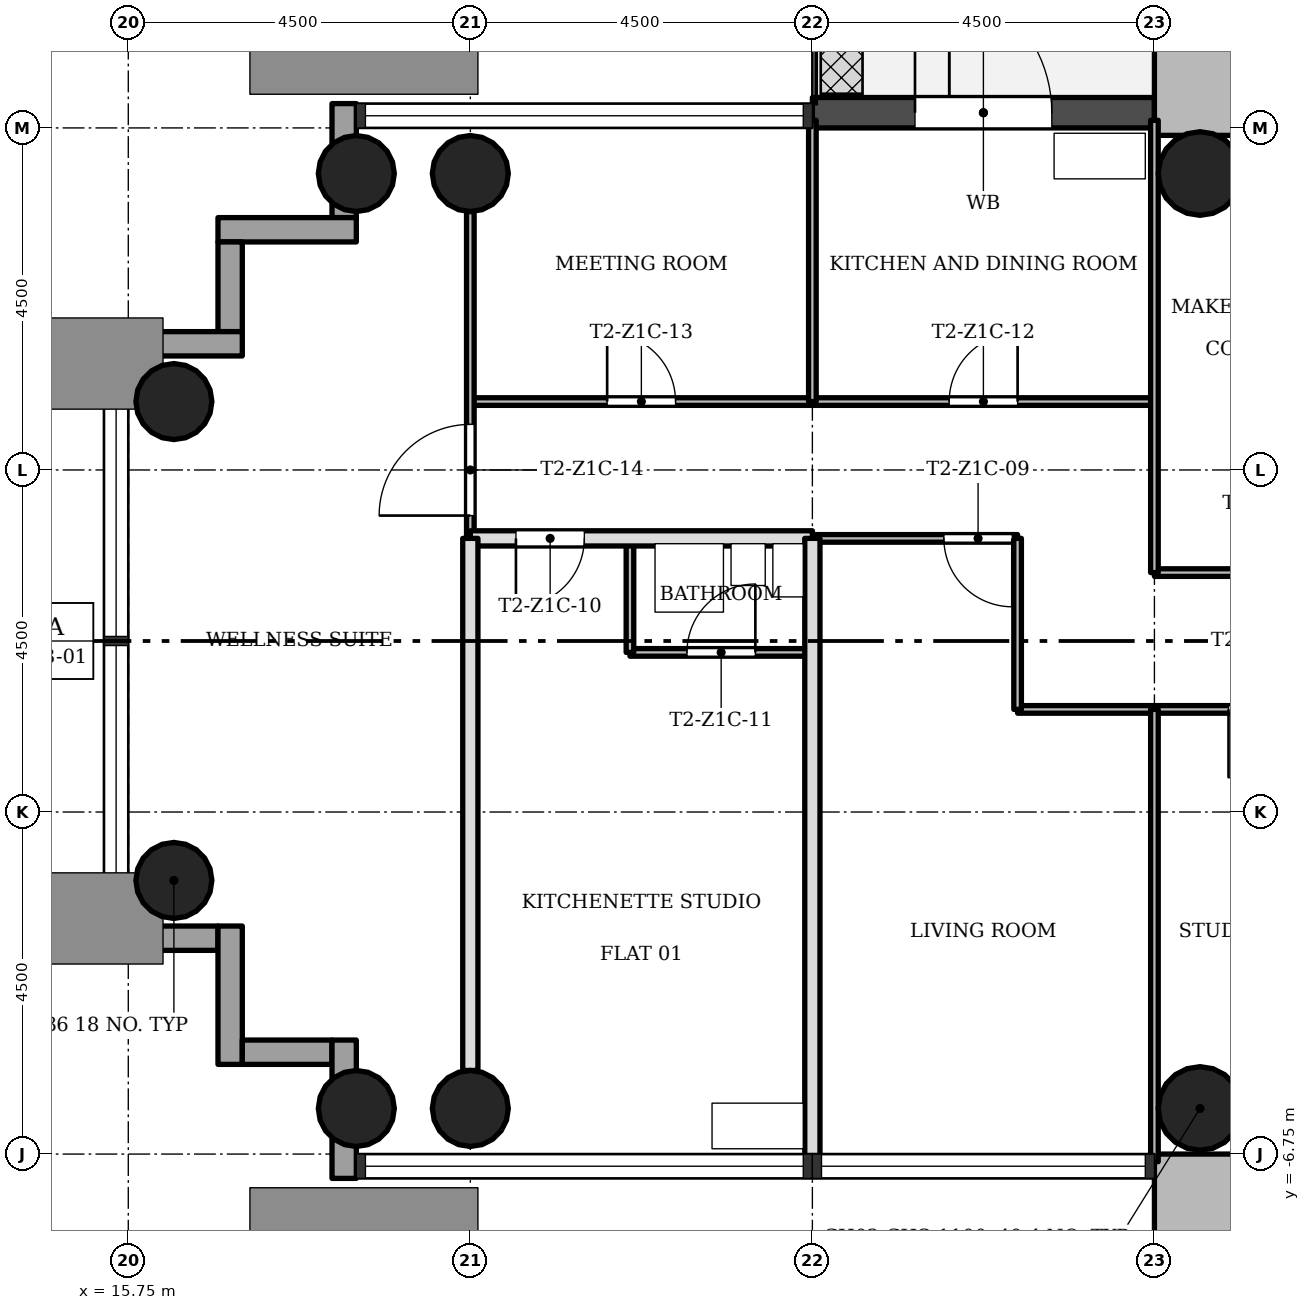
"""IFC4 building model, lengths in metres.
Left out: names, types, materials, properties, quantities, classifications, styles, units other than length and angle.
Written with IfcOpenShell. Run it as: python <this file> out.ifc"""

import sys

from ifc_helpers import new_model, si_unit, direction, frame, frame_2d, origin, origin_2d, place, context, subcontext, project, spatial, rectangle, hollow_circle, extrude, element, fill, save


model = new_model("IFC4")
c1 = context("Model", 3, precision=1e-05, world=origin(), true_north=direction((0.0, 1.0)))
c2 = subcontext(c1, "Body", "Model", "MODEL_VIEW")
j1 = project(units=[si_unit("LENGTHUNIT", "METRE"), si_unit("PLANEANGLEUNIT", "RADIAN")], contexts=[c1])
p1 = place(None, origin())
s1 = spatial("IfcSite", under=j1, at=p1, CompositionType="ELEMENT")
p2 = place(p1, origin())
s2 = spatial("IfcBuilding", under=s1, at=p2, CompositionType="ELEMENT")
p3 = place(p2, frame((0.0, 0.0, 44.9)))
s3 = spatial("IfcBuildingStorey", under=s2, at=p3, CompositionType="ELEMENT", Elevation=44.9)
p4 = place(p3, frame((29.8, 15.248, 0.0), z_axis=(0.0, 0.0, 1.0), x_axis=(0.0, -1.0, 0.0)))
e1 = element("IfcWall", 1, at=p4, inside=s3, PredefinedType="SHEAR", context=c2, shape_type="SweptSolid", body=[
    extrude(rectangle(XDim=8.596, YDim=1.1, at=frame_2d((4.298, 0.0))), origin(), (0.0, 0.0, 1.0), 3.4),
])
p5 = place(p3, frame((41.65, -7.3, 0.0), z_axis=(0.0, 0.0, 1.0), x_axis=(-1.0, 0.0, 0.0)))
e2 = element("IfcWall", 2, at=p5, inside=s3, PredefinedType="SHEAR", context=c2, shape_type="SweptSolid", body=[
    extrude(rectangle(XDim=12.4, YDim=1.1, at=frame_2d((6.2, 0.0))), origin(), (0.0, 0.0, 1.0), 3.4),
])
p6 = place(p5, frame((4.75, 0.0, 0.0)))
e3 = element("IfcOpeningElement", 3, at=p6, cuts=e2, PredefinedType="OPENING", context=c2, shape_type="SweptSolid", body=[
    extrude(rectangle(XDim=1.8, YDim=2.1, at=frame_2d((0.9, 1.05))), frame((0.0, 0.56, 0.0), z_axis=(0.0, -1.0, 0.0), x_axis=(1.0, 0.0, 0.0)), (0.0, 0.0, 1.0), 1.12),
])
for number, where, z_axis, x_axis in (
    (4, (20.25, 6.15, 0.0), (0.0, 0.0, 1.0), (1.0, 0.0, 0.0)),
    (5, (20.25, -6.15, 0.0), (0.0, 0.0, 1.0), (1.0, 0.0, 0.0)),
    (6, (18.75, 6.15, 0.0), (0.0, 0.0, 1.0), (1.0, 0.0, 0.0)),
    (7, (18.75, -6.15, 0.0), (0.0, 0.0, 1.0), (1.0, 0.0, 0.0)),
    (8, (16.35, 3.15, 0.0), (0.0, 0.0, 1.0), (1.0, 0.0, 0.0)),
    (9, (16.35, -3.15, 0.0), (0.0, 0.0, 1.0), (1.0, 0.0, 0.0)),
):
    element("IfcColumn", number, at=place(p3, frame(where, z_axis=z_axis, x_axis=x_axis)), inside=s3, PredefinedType="COLUMN", context=c2, shape_type="SweptSolid", body=[
        extrude(hollow_circle(Radius=0.5, WallThickness=0.036, at=origin_2d()), origin(), (0.0, 0.0, 1.0), 3.4),
    ])
for number, where, z_axis, x_axis in (
    (10, (29.85, 6.15, 0.0), (0.0, 0.0, 1.0), (1.0, 0.0, 0.0)),
    (11, (29.85, -6.15, 0.0), (0.0, 0.0, 1.0), (1.0, 0.0, 0.0)),
):
    element("IfcColumn", number, at=place(p3, frame(where, z_axis=z_axis, x_axis=x_axis)), inside=s3, PredefinedType="COLUMN", context=c2, shape_type="SweptSolid", body=[
        extrude(hollow_circle(Radius=0.55, WallThickness=0.04, at=origin_2d()), origin(), (0.0, 0.0, 1.0), 3.4),
    ])
p7 = place(p3, frame((29.25, 6.95, -0.02), z_axis=(0.0, 0.0, 1.0), x_axis=(-1.0, 0.0, 0.0)))
e12 = element("IfcWall", 12, at=p7, inside=s3, PredefinedType="STANDARD", context=c2, shape_type="SweptSolid", body=[
    extrude(rectangle(XDim=4.5, YDim=0.4, at=frame_2d((2.25, 0.0))), origin(), (0.0, 0.0, 1.0), 3.12),
])
p8 = place(p7, frame((1.35, 0.0, 0.02)))
e13 = element("IfcOpeningElement", 13, at=p8, cuts=e12, PredefinedType="OPENING", context=c2, shape_type="SweptSolid", body=[
    extrude(rectangle(XDim=1.8, YDim=2.1, at=frame_2d((0.9, 1.05))), frame((0.0, 0.21, 0.0), z_axis=(0.0, -1.0, 0.0), x_axis=(1.0, 0.0, 0.0)), (0.0, 0.0, 1.0), 0.42),
])
p9 = place(p3, frame((18.59, 7.07, -0.3), z_axis=(0.0, 0.0, 1.0), x_axis=(0.0, -1.0, 0.0)))
e14 = element("IfcWall", 14, at=p9, inside=s3, PredefinedType="STANDARD", context=c2, shape_type="SweptSolid", body=[
    extrude(rectangle(XDim=1.5, YDim=0.32, at=frame_2d((0.75, 0.0))), origin(), (0.0, 0.0, 1.0), 3.4),
])
p10 = place(p3, frame((18.75, 5.41, -0.3), z_axis=(0.0, 0.0, 1.0), x_axis=(-1.0, 0.0, 0.0)))
e15 = element("IfcWall", 15, at=p10, inside=s3, PredefinedType="STANDARD", context=c2, shape_type="SweptSolid", body=[
    extrude(rectangle(XDim=1.82, YDim=0.32, at=frame_2d((0.91, 0.0))), origin(), (0.0, 0.0, 1.0), 3.4),
])
p11 = place(p3, frame((17.09, 5.25, -0.3), z_axis=(0.0, 0.0, 1.0), x_axis=(0.0, -1.0, 0.0)))
e16 = element("IfcWall", 16, at=p11, inside=s3, PredefinedType="STANDARD", context=c2, shape_type="SweptSolid", body=[
    extrude(rectangle(XDim=1.18, YDim=0.32, at=frame_2d((0.59, 0.0))), origin(), (0.0, 0.0, 1.0), 3.4),
])
p12 = place(p3, frame((17.25, 3.91, -0.3), z_axis=(0.0, 0.0, 1.0), x_axis=(-1.0, 0.0, 0.0)))
e17 = element("IfcWall", 17, at=p12, inside=s3, PredefinedType="STANDARD", context=c2, shape_type="SweptSolid", body=[
    extrude(rectangle(XDim=1.82, YDim=0.32, at=frame_2d((0.91, 0.0))), origin(), (0.0, 0.0, 1.0), 3.4),
])
p13 = place(p3, frame((15.43, -3.91, -0.3), z_axis=(0.0, 0.0, 1.0), x_axis=(1.0, 0.0, 0.0)))
e18 = element("IfcWall", 18, at=p13, inside=s3, PredefinedType="STANDARD", context=c2, shape_type="SweptSolid", body=[
    extrude(rectangle(XDim=1.5, YDim=0.32, at=frame_2d((0.75, 0.0))), origin(), (0.0, 0.0, 1.0), 3.4),
])
p14 = place(p3, frame((17.09, -3.75, -0.3), z_axis=(0.0, 0.0, 1.0), x_axis=(0.0, -1.0, 0.0)))
e19 = element("IfcWall", 19, at=p14, inside=s3, PredefinedType="STANDARD", context=c2, shape_type="SweptSolid", body=[
    extrude(rectangle(XDim=1.82, YDim=0.32, at=frame_2d((0.91, 0.0))), origin(), (0.0, 0.0, 1.0), 3.4),
])
p15 = place(p3, frame((17.25, -5.41, -0.3), z_axis=(0.0, 0.0, 1.0), x_axis=(1.0, 0.0, 0.0)))
e20 = element("IfcWall", 20, at=p15, inside=s3, PredefinedType="STANDARD", context=c2, shape_type="SweptSolid", body=[
    extrude(rectangle(XDim=1.18, YDim=0.32, at=frame_2d((0.59, 0.0))), origin(), (0.0, 0.0, 1.0), 3.4),
])
p16 = place(p3, frame((18.59, -5.25, -0.3), z_axis=(0.0, 0.0, 1.0), x_axis=(0.0, -1.0, 0.0)))
e21 = element("IfcWall", 21, at=p16, inside=s3, PredefinedType="STANDARD", context=c2, shape_type="SweptSolid", body=[
    extrude(rectangle(XDim=1.82, YDim=0.32, at=frame_2d((0.91, 0.0))), origin(), (0.0, 0.0, 1.0), 3.4),
])
p17 = place(p3, frame((34.5, -0.9, 0.0), z_axis=(0.0, 0.0, 1.0), x_axis=(-1.0, 0.0, 0.0)))
e22 = element("IfcWall", 22, at=p17, inside=s3, PredefinedType="PARTITIONING", context=c2, shape_type="SweptSolid", body=[
    extrude(rectangle(XDim=7.05, YDim=0.1, at=frame_2d((3.525, 0.0))), origin(), (0.0, 0.0, 1.0), 3.0),
])
p18 = place(p17, frame((0.75, 0.0, 0.0)))
e23 = element("IfcOpeningElement", 23, at=p18, cuts=e22, PredefinedType="OPENING", context=c2, shape_type="SweptSolid", body=[
    extrude(rectangle(XDim=0.9, YDim=2.1, at=frame_2d((0.45, 1.05))), frame((0.0, 0.06, 0.0), z_axis=(0.0, -1.0, 0.0), x_axis=(1.0, 0.0, 0.0)), (0.0, 0.0, 1.0), 0.12),
])
p19 = place(p17, frame((3.375, 0.0, 0.0)))
e24 = element("IfcOpeningElement", 24, at=p19, cuts=e22, PredefinedType="OPENING", context=c2, shape_type="SweptSolid", body=[
    extrude(rectangle(XDim=0.9, YDim=2.1, at=frame_2d((0.45, 1.05))), frame((0.0, 0.06, 0.0), z_axis=(0.0, -1.0, 0.0), x_axis=(1.0, 0.0, 0.0)), (0.0, 0.0, 1.0), 0.12),
])
p20 = place(p3, frame((24.75, -0.15, 0.0), z_axis=(0.0, 0.0, 1.0), x_axis=(-1.0, 0.0, 0.0)))
e25 = element("IfcWall", 25, at=p20, inside=s3, PredefinedType="PARTITIONING", context=c2, shape_type="SweptSolid", body=[
    extrude(rectangle(XDim=2.4, YDim=0.1, at=frame_2d((1.2, 0.0))), origin(), (0.0, 0.0, 1.0), 3.0),
])
p21 = place(p20, frame((0.75, 0.0, 0.0)))
e26 = element("IfcOpeningElement", 26, at=p21, cuts=e25, PredefinedType="OPENING", context=c2, shape_type="SweptSolid", body=[
    extrude(rectangle(XDim=0.9, YDim=2.1, at=frame_2d((0.45, 1.05))), frame((0.0, 0.06, 0.0), z_axis=(0.0, -1.0, 0.0), x_axis=(1.0, 0.0, 0.0)), (0.0, 0.0, 1.0), 0.12),
])
p22 = place(p3, frame((34.5, 0.9, 0.0), z_axis=(0.0, 0.0, 1.0), x_axis=(-1.0, 0.0, 0.0)))
e27 = element("IfcWall", 27, at=p22, inside=s3, PredefinedType="PARTITIONING", context=c2, shape_type="SweptSolid", body=[
    extrude(rectangle(XDim=5.25, YDim=0.1, at=frame_2d((2.625, 0.0))), origin(), (0.0, 0.0, 1.0), 3.0),
])
p23 = place(p22, frame((3.225, 0.0, 0.0)))
e28 = element("IfcOpeningElement", 28, at=p23, cuts=e27, PredefinedType="OPENING", context=c2, shape_type="SweptSolid", body=[
    extrude(rectangle(XDim=0.9, YDim=2.1, at=frame_2d((0.45, 1.05))), frame((0.0, 0.06, 0.0), z_axis=(0.0, -1.0, 0.0), x_axis=(1.0, 0.0, 0.0)), (0.0, 0.0, 1.0), 0.12),
])
p24 = place(p3, frame((27.45, 1.35, 0.0), z_axis=(0.0, 0.0, 1.0), x_axis=(-1.0, 0.0, 0.0)))
e29 = element("IfcWall", 29, at=p24, inside=s3, PredefinedType="PARTITIONING", context=c2, shape_type="SweptSolid", body=[
    extrude(rectangle(XDim=2.7, YDim=0.1, at=frame_2d((1.35, 0.0))), origin(), (0.0, 0.0, 1.0), 3.0),
])
p25 = place(p24, frame((0.07, 0.0, 0.0)))
e30 = element("IfcOpeningElement", 30, at=p25, cuts=e29, PredefinedType="OPENING", context=c2, shape_type="SweptSolid", body=[
    extrude(rectangle(XDim=0.9, YDim=2.1, at=frame_2d((0.45, 1.05))), frame((0.0, 0.06, 0.0), z_axis=(0.0, -1.0, 0.0), x_axis=(1.0, 0.0, 0.0)), (0.0, 0.0, 1.0), 0.12),
])
p26 = place(p3, frame((24.75, 1.35, 0.0), z_axis=(0.0, 0.0, 1.0), x_axis=(-1.0, 0.0, 0.0)))
e31 = element("IfcWall", 31, at=p26, inside=s3, PredefinedType="SOLIDWALL", context=c2, shape_type="SweptSolid", body=[
    extrude(rectangle(XDim=4.5, YDim=0.2, at=frame_2d((2.25, 0.0))), origin(), (0.0, 0.0, 1.0), 3.0),
])
p27 = place(p26, frame((3.0, 0.0, 0.0)))
e32 = element("IfcOpeningElement", 32, at=p27, cuts=e31, PredefinedType="OPENING", context=c2, shape_type="SweptSolid", body=[
    extrude(rectangle(XDim=0.9, YDim=2.1, at=frame_2d((0.45, 1.05))), frame((0.0, 0.11, 0.0), z_axis=(0.0, -1.0, 0.0), x_axis=(1.0, 0.0, 0.0)), (0.0, 0.0, 1.0), 0.22),
])
p28 = place(p3, frame((29.25, 3.15, 0.0), z_axis=(0.0, 0.0, 1.0), x_axis=(-1.0, 0.0, 0.0)))
e33 = element("IfcWall", 33, at=p28, inside=s3, PredefinedType="PARTITIONING", context=c2, shape_type="SweptSolid", body=[
    extrude(rectangle(XDim=9.0, YDim=0.1, at=frame_2d((4.5, 0.0))), origin(), (0.0, 0.0, 1.0), 3.0),
])
p29 = place(p28, frame((1.8, 0.0, 0.0)))
e34 = element("IfcOpeningElement", 34, at=p29, cuts=e33, PredefinedType="OPENING", context=c2, shape_type="SweptSolid", body=[
    extrude(rectangle(XDim=0.9, YDim=2.1, at=frame_2d((0.45, 1.05))), frame((0.0, 0.06, 0.0), z_axis=(0.0, -1.0, 0.0), x_axis=(1.0, 0.0, 0.0)), (0.0, 0.0, 1.0), 0.12),
])
p30 = place(p28, frame((6.3, 0.0, 0.0)))
e35 = element("IfcOpeningElement", 35, at=p30, cuts=e33, PredefinedType="OPENING", context=c2, shape_type="SweptSolid", body=[
    extrude(rectangle(XDim=0.9, YDim=2.1, at=frame_2d((0.45, 1.05))), frame((0.0, 0.06, 0.0), z_axis=(0.0, -1.0, 0.0), x_axis=(1.0, 0.0, 0.0)), (0.0, 0.0, 1.0), 0.12),
])
for number, where, z_axis, x_axis in (
    (36, (29.25, -6.85, 0.0), (0.0, 0.0, 1.0), (0.0, 1.0, 0.0)),
    (37, (29.25, 0.9, 0.0), (0.0, 0.0, 1.0), (0.0, 1.0, 0.0)),
):
    element("IfcWall", number, at=place(p3, frame(where, z_axis=z_axis, x_axis=x_axis)), inside=s3, PredefinedType="PARTITIONING", context=c2, shape_type="SweptSolid", body=[
        extrude(rectangle(XDim=5.95, YDim=0.1, at=frame_2d((2.975, 0.0))), origin(), (0.0, 0.0, 1.0), 3.0),
    ])
p31 = place(p3, frame((27.45, -0.9, 0.0), z_axis=(0.0, 0.0, 1.0), x_axis=(0.0, 1.0, 0.0)))
e38 = element("IfcWall", 38, at=p31, inside=s3, PredefinedType="PARTITIONING", context=c2, shape_type="SweptSolid", body=[
    extrude(rectangle(XDim=2.25, YDim=0.1, at=frame_2d((1.125, 0.0))), origin(), (0.0, 0.0, 1.0), 3.0),
])
p32 = place(p3, frame((24.75, 3.15, 0.0), z_axis=(0.0, 0.0, 1.0), x_axis=(0.0, 1.0, 0.0)))
e39 = element("IfcWall", 39, at=p32, inside=s3, PredefinedType="PARTITIONING", context=c2, shape_type="SweptSolid", body=[
    extrude(rectangle(XDim=3.7, YDim=0.1, at=frame_2d((1.85, 0.0))), origin(), (0.0, 0.0, 1.0), 3.0),
])
p33 = place(p3, frame((24.75, -6.85, 0.0), z_axis=(0.0, 0.0, 1.0), x_axis=(0.0, 1.0, 0.0)))
e40 = element("IfcWall", 40, at=p33, inside=s3, PredefinedType="SOLIDWALL", context=c2, shape_type="SweptSolid", body=[
    extrude(rectangle(XDim=8.2, YDim=0.2, at=frame_2d((4.1, 0.0))), origin(), (0.0, 0.0, 1.0), 3.0),
])
p34 = place(p3, frame((22.35, -0.15, 0.0), z_axis=(0.0, 0.0, 1.0), x_axis=(0.0, 1.0, 0.0)))
e41 = element("IfcWall", 41, at=p34, inside=s3, PredefinedType="PARTITIONING", context=c2, shape_type="SweptSolid", body=[
    extrude(rectangle(XDim=1.5, YDim=0.1, at=frame_2d((0.75, 0.0))), origin(), (0.0, 0.0, 1.0), 3.0),
])
p35 = place(p3, frame((20.25, 1.35, 0.0), z_axis=(0.0, 0.0, 1.0), x_axis=(0.0, 1.0, 0.0)))
e42 = element("IfcWall", 42, at=p35, inside=s3, PredefinedType="PARTITIONING", context=c2, shape_type="SweptSolid", body=[
    extrude(rectangle(XDim=4.3, YDim=0.1, at=frame_2d((2.15, 0.0))), origin(), (0.0, 0.0, 1.0), 3.0),
])
p36 = place(p35, frame((0.3, 0.0, 0.0)))
e43 = element("IfcOpeningElement", 43, at=p36, cuts=e42, PredefinedType="OPENING", context=c2, shape_type="SweptSolid", body=[
    extrude(rectangle(XDim=1.2, YDim=2.1, at=frame_2d((0.6, 1.05))), frame((0.0, 0.06, 0.0), z_axis=(0.0, -1.0, 0.0), x_axis=(1.0, 0.0, 0.0)), (0.0, 0.0, 1.0), 0.12),
])
p37 = place(p3, frame((20.25, -5.65, 0.0), z_axis=(0.0, 0.0, 1.0), x_axis=(0.0, 1.0, 0.0)))
e44 = element("IfcWall", 44, at=p37, inside=s3, PredefinedType="SOLIDWALL", context=c2, shape_type="SweptSolid", body=[
    extrude(rectangle(XDim=7.0, YDim=0.2, at=frame_2d((3.5, 0.0))), origin(), (0.0, 0.0, 1.0), 3.0),
])
p38 = place(p8, origin())
e45 = element("IfcDoor", 45, at=p38, inside=s3, OperationType="SINGLE_SWING_RIGHT", PredefinedType="DOOR", context=c2, shape_type="SweptSolid", body=[
    extrude(rectangle(XDim=1.8, YDim=2.1, at=frame_2d((0.9, 1.05))), frame((0.0, 0.025, 0.0), z_axis=(0.0, -1.0, 0.0), x_axis=(1.0, 0.0, 0.0)), (0.0, 0.0, 1.0), 0.05),
])
fill(e13, e45)
p39 = place(p19, origin())
e46 = element("IfcDoor", 46, at=p39, inside=s3, OperationType="SINGLE_SWING_LEFT", PredefinedType="DOOR", context=c2, shape_type="SweptSolid", body=[
    extrude(rectangle(XDim=0.9, YDim=2.1, at=frame_2d((0.45, 1.05))), frame((0.0, 0.025, 0.0), z_axis=(0.0, -1.0, 0.0), x_axis=(1.0, 0.0, 0.0)), (0.0, 0.0, 1.0), 0.05),
])
fill(e24, e46)
p40 = place(p25, origin())
e47 = element("IfcDoor", 47, at=p40, inside=s3, OperationType="SINGLE_SWING_RIGHT", PredefinedType="DOOR", context=c2, shape_type="SweptSolid", body=[
    extrude(rectangle(XDim=0.9, YDim=2.1, at=frame_2d((0.45, 1.05))), frame((0.0, 0.025, 0.0), z_axis=(0.0, -1.0, 0.0), x_axis=(1.0, 0.0, 0.0)), (0.0, 0.0, 1.0), 0.05),
])
fill(e30, e47)
p41 = place(p27, origin())
e48 = element("IfcDoor", 48, at=p41, inside=s3, OperationType="SINGLE_SWING_LEFT", PredefinedType="DOOR", context=c2, shape_type="SweptSolid", body=[
    extrude(rectangle(XDim=0.9, YDim=2.1, at=frame_2d((0.45, 1.05))), frame((0.0, 0.025, 0.0), z_axis=(0.0, -1.0, 0.0), x_axis=(1.0, 0.0, 0.0)), (0.0, 0.0, 1.0), 0.05),
])
fill(e32, e48)
p42 = place(p21, origin())
e49 = element("IfcDoor", 49, at=p42, inside=s3, OperationType="SINGLE_SWING_LEFT", PredefinedType="DOOR", context=c2, shape_type="SweptSolid", body=[
    extrude(rectangle(XDim=0.9, YDim=2.1, at=frame_2d((0.45, 1.05))), frame((0.0, 0.025, 0.0), z_axis=(0.0, -1.0, 0.0), x_axis=(1.0, 0.0, 0.0)), (0.0, 0.0, 1.0), 0.05),
])
fill(e26, e49)
p43 = place(p29, origin())
e50 = element("IfcDoor", 50, at=p43, inside=s3, OperationType="SINGLE_SWING_LEFT", PredefinedType="DOOR", context=c2, shape_type="SweptSolid", body=[
    extrude(rectangle(XDim=0.9, YDim=2.1, at=frame_2d((0.45, 1.05))), frame((0.0, 0.025, 0.0), z_axis=(0.0, -1.0, 0.0), x_axis=(1.0, 0.0, 0.0)), (0.0, 0.0, 1.0), 0.05),
])
fill(e34, e50)
p44 = place(p30, origin())
e51 = element("IfcDoor", 51, at=p44, inside=s3, OperationType="SINGLE_SWING_RIGHT", PredefinedType="DOOR", context=c2, shape_type="SweptSolid", body=[
    extrude(rectangle(XDim=0.9, YDim=2.1, at=frame_2d((0.45, 1.05))), frame((0.0, 0.025, 0.0), z_axis=(0.0, -1.0, 0.0), x_axis=(1.0, 0.0, 0.0)), (0.0, 0.0, 1.0), 0.05),
])
fill(e35, e51)
p45 = place(p36, origin())
e52 = element("IfcDoor", 52, at=p45, inside=s3, OperationType="SINGLE_SWING_RIGHT", PredefinedType="DOOR", context=c2, shape_type="SweptSolid", body=[
    extrude(rectangle(XDim=1.2, YDim=2.1, at=frame_2d((0.6, 1.05))), frame((0.0, 0.025, 0.0), z_axis=(0.0, -1.0, 0.0), x_axis=(1.0, 0.0, 0.0)), (0.0, 0.0, 1.0), 0.05),
])
fill(e43, e52)
save(model, sys.argv[1])
